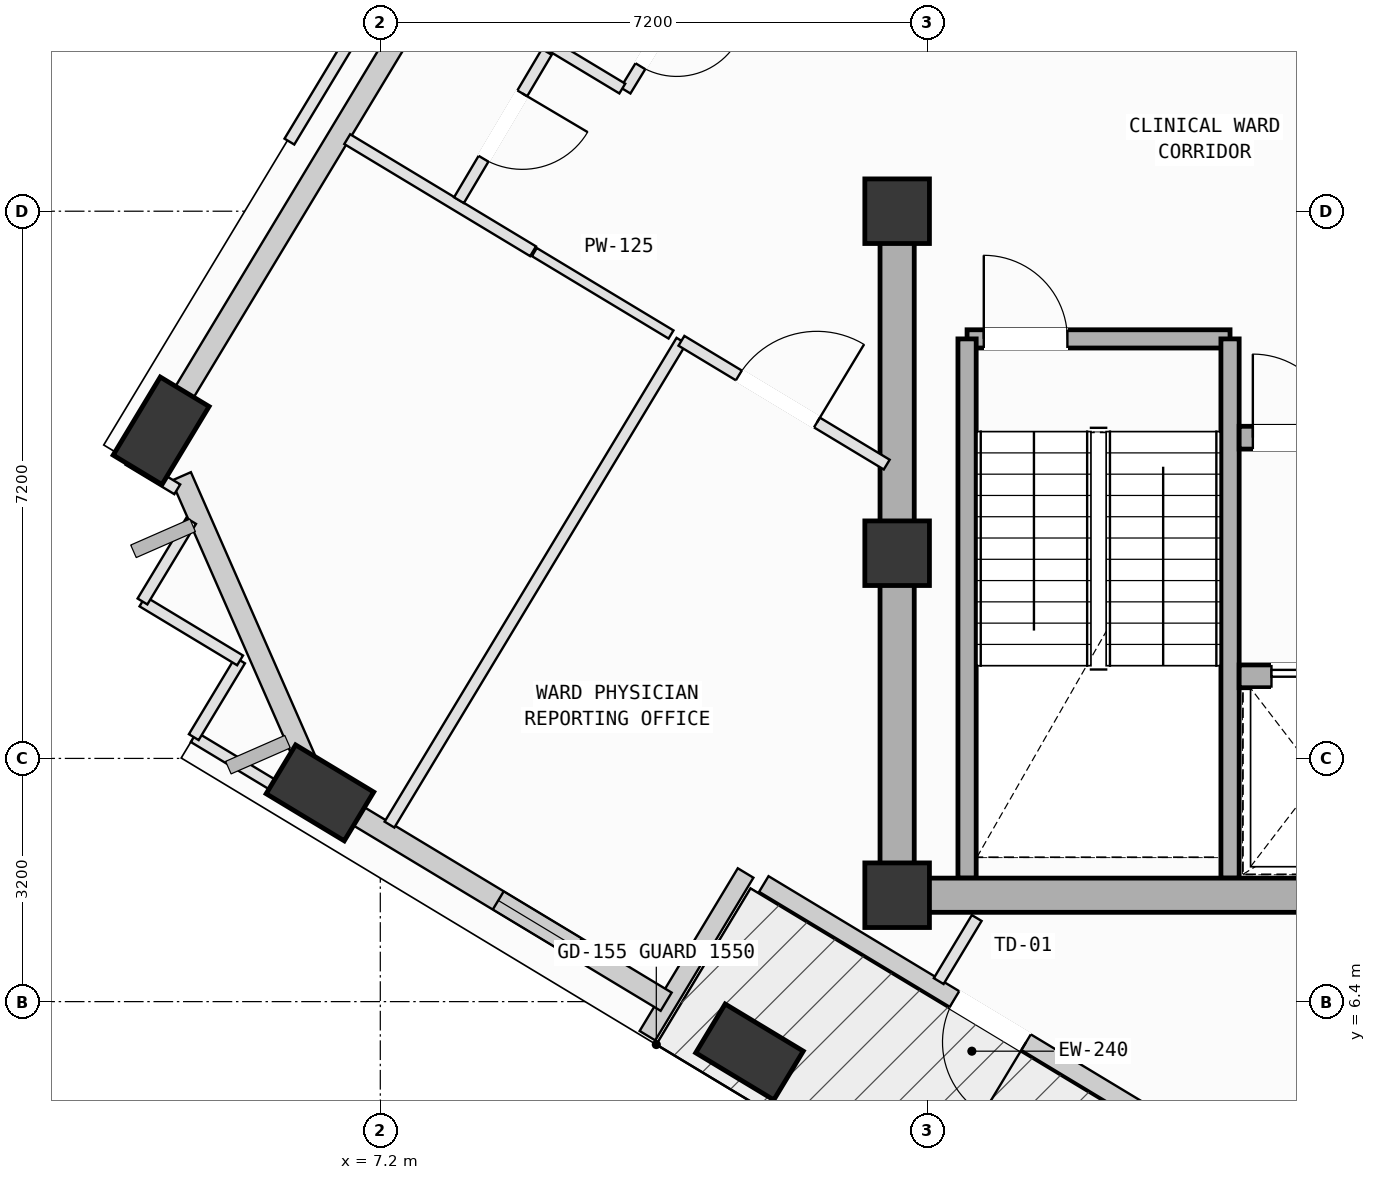
"""IFC4 building model, lengths in metres.
Left out: names, types, materials, properties, quantities, classifications, styles, units other than length and angle.
Written with IfcOpenShell. Run it as: python <this file> out.ifc"""

import sys

from ifc_helpers import new_model, si_unit, direction, frame, frame_2d, origin, origin_2d, place, context, subcontext, project, spatial, rectangle, extrude, element, fill, save


model = new_model("IFC4")
c1 = context("Model", 3, precision=1e-05, world=origin(), true_north=direction((0.0, 1.0)))
c2 = subcontext(c1, "Body", "Model", "MODEL_VIEW")
j1 = project(units=[si_unit("LENGTHUNIT", "METRE"), si_unit("PLANEANGLEUNIT", "RADIAN")], contexts=[c1])
p1 = place(None, origin())
s1 = spatial("IfcSite", under=j1, at=p1, CompositionType="ELEMENT")
p2 = place(p1, origin())
s2 = spatial("IfcBuilding", under=s1, at=p2, CompositionType="ELEMENT")
p3 = place(p2, frame((0.0, 0.0, 276.6)))
s3 = spatial("IfcBuildingStorey", under=s2, at=p3, CompositionType="ELEMENT", Elevation=276.6)
for number, where, z_axis, x_axis in (
    (1, (14.0, 7.8, 0.0), (0.0, 0.0, 1.0), (1.0, 0.0, 0.0)),
    (2, (14.0, 12.3, 0.0), (0.0, 0.0, 1.0), (1.0, 0.0, 0.0)),
    (3, (14.0, 16.8, 0.0), (0.0, 0.0, 1.0), (1.0, 0.0, 0.0)),
):
    element("IfcColumn", number, at=place(p3, frame(where, z_axis=z_axis, x_axis=x_axis)), inside=s3, PredefinedType="COLUMN", context=c2, shape_type="SweptSolid", body=[
        extrude(rectangle(XDim=0.85, YDim=0.85, at=origin_2d()), origin(), (0.0, 0.0, 1.0), 4.0),
    ])
p4 = place(p3, frame((4.316, 13.911, 0.002), z_axis=(0.045741739256, -0.120019053598, 0.991717258125), x_axis=(0.180248165753, 0.977453424246, 0.109979098802)))
e4 = element("IfcColumn", 4, at=p4, inside=s3, PredefinedType="COLUMN", context=c2, shape_type="SweptSolid", body=[
    extrude(rectangle(XDim=1.2, YDim=0.75, at=origin_2d()), origin(), (0.0, 0.0, 1.0), 4.03),
])
p5 = place(p3, frame((6.406, 9.146, 0.002), z_axis=(0.065245773454, -0.111226778145, 0.991650943059), x_axis=(-0.997742461186, 0.008568024773, 0.066607582881)))
e5 = element("IfcColumn", 5, at=p5, inside=s3, PredefinedType="COLUMN", context=c2, shape_type="SweptSolid", body=[
    extrude(rectangle(XDim=1.2, YDim=0.75, at=origin_2d()), origin(), (0.0, 0.0, 1.0), 4.03),
])
p6 = place(p3, frame((12.057, 5.738, 0.002), z_axis=(0.079223540484, -0.088019415959, 0.992963349297), x_axis=(-0.979562133865, -0.191615202588, 0.06116894666)))
e6 = element("IfcColumn", 6, at=p6, inside=s3, PredefinedType="COLUMN", context=c2, shape_type="SweptSolid", body=[
    extrude(rectangle(XDim=1.2, YDim=0.75, at=origin_2d()), origin(), (0.0, 0.0, 1.0), 4.025),
])
p7 = place(p3, frame((18.206, 4.353, 0.0), z_axis=(0.0, 0.0, 1.0), x_axis=(-0.856267913318, 0.516531955084, 0.0)))
e7 = element("IfcWall", 7, at=p7, inside=s3, PredefinedType="SOLIDWALL", context=c2, shape_type="SweptSolid", body=[
    extrude(rectangle(XDim=6.96, YDim=0.24, at=frame_2d((3.48, 0.0))), origin(), (0.0, 0.0, 1.0), 3.265),
])
p8 = place(p7, frame((2.93, 0.0, 0.0)))
e8 = element("IfcOpeningElement", 8, at=p8, cuts=e7, PredefinedType="OPENING", context=c2, shape_type="SweptSolid", body=[
    extrude(rectangle(XDim=1.1, YDim=2.15, at=frame_2d((0.55, 1.075))), frame((0.0, 0.13, 0.0), z_axis=(0.0, -1.0, 0.0), x_axis=(1.0, 0.0, 0.0)), (0.0, 0.0, 1.0), 0.26),
])
p9 = place(p3, frame((12.006, 8.093, 0.0), z_axis=(0.0, 0.0, 1.0), x_axis=(-0.516590911312, -0.856232346008, 0.0)))
e9 = element("IfcWall", 9, at=p9, inside=s3, PredefinedType="SOLIDWALL", context=c2, shape_type="SweptSolid", body=[
    extrude(rectangle(XDim=2.5, YDim=0.24, at=frame_2d((1.25, 0.0))), origin(), (0.0, 0.0, 1.0), 3.265),
])
p10 = place(p3, frame((4.41, 14.066, 0.0), z_axis=(0.0, 0.0, 1.0), x_axis=(0.516542521572, 0.856261539138, 0.0)))
e10 = element("IfcWall", 10, at=p10, inside=s3, PredefinedType="SOLIDWALL", context=c2, shape_type="SweptSolid", body=[
    extrude(rectangle(XDim=7.485, YDim=0.28, at=frame_2d((3.742, 0.0))), origin(), (0.0, 0.0, 1.0), 3.265),
])
p11 = place(p3, frame((6.351, 9.273, 0.0), z_axis=(0.0, 0.0, 1.0), x_axis=(-0.401698979628, 0.91577176729, 0.0)))
e11 = element("IfcWall", 11, at=p11, inside=s3, PredefinedType="SOLIDWALL", context=c2, shape_type="SweptSolid", body=[
    extrude(rectangle(XDim=4.408, YDim=0.28, at=frame_2d((2.204, 0.0))), origin(), (0.0, 0.0, 1.0), 3.265),
])
p12 = place(p3, frame((10.961, 6.399, 0.0), z_axis=(0.0, 0.0, 1.0), x_axis=(-0.856261128113, 0.51654320292, 0.0)))
e12 = element("IfcWall", 12, at=p12, inside=s3, PredefinedType="SOLIDWALL", context=c2, shape_type="SweptSolid", body=[
    extrude(rectangle(XDim=4.714, YDim=0.28, at=frame_2d((2.357, 0.0))), origin(), (0.0, 0.0, 1.0), 3.245),
])
p13 = place(p12, frame((1.38, 0.0, 0.75)))
e13 = element("IfcOpeningElement", 13, at=p13, cuts=e12, PredefinedType="OPENING", context=c2, shape_type="SweptSolid", body=[
    extrude(rectangle(XDim=1.2, YDim=1.75, at=frame_2d((0.6, 0.875))), frame((0.0, 0.15, 0.0), z_axis=(0.0, -1.0, 0.0), x_axis=(1.0, 0.0, 0.0)), (0.0, 0.0, 1.0), 0.3),
])
p14 = place(p3, frame((14.92, 15.12, 0.0), z_axis=(0.0, 0.0, 1.0), x_axis=(1.0, 0.0, 0.0)))
e14 = element("IfcWall", 14, at=p14, inside=s3, PredefinedType="SOLIDWALL", context=c2, shape_type="SweptSolid", body=[
    extrude(rectangle(XDim=3.46, YDim=0.24, at=frame_2d((1.73, 0.0))), origin(), (0.0, 0.0, 1.0), 3.78),
])
p15 = place(p14, frame((0.22, 0.0, 0.0)))
e15 = element("IfcOpeningElement", 15, at=p15, cuts=e14, PredefinedType="OPENING", context=c2, shape_type="SweptSolid", body=[
    extrude(rectangle(XDim=1.1, YDim=2.15, at=frame_2d((0.55, 1.075))), frame((0.0, 0.13, 0.0), z_axis=(0.0, -1.0, 0.0), x_axis=(1.0, 0.0, 0.0)), (0.0, 0.0, 1.0), 0.26),
])
for number, where, z_axis, x_axis in (
    (16, (18.38, 15.12, 0.0), (0.0, 0.0, 1.0), (0.0, -1.0, 0.0)),
    (17, (14.92, 8.025, 0.0), (0.0, 0.0, 1.0), (0.0, 1.0, 0.0)),
):
    element("IfcWall", number, at=place(p3, frame(where, z_axis=z_axis, x_axis=x_axis)), inside=s3, PredefinedType="SOLIDWALL", context=c2, shape_type="SweptSolid", body=[
        extrude(rectangle(XDim=7.095, YDim=0.24, at=frame_2d((3.548, 0.0))), origin(), (0.0, 0.0, 1.0), 3.78),
    ])
p16 = place(p3, frame((14.0, 7.8, 0.0), z_axis=(0.0, 0.0, 1.0), x_axis=(1.0, 0.0, 0.0)))
e18 = element("IfcWall", 18, at=p16, inside=s3, PredefinedType="SHEAR", context=c2, shape_type="SweptSolid", body=[
    extrude(rectangle(XDim=10.8, YDim=0.45, at=frame_2d((5.4, 0.0))), origin(), (0.0, 0.0, 1.0), 3.78),
])
p17 = place(p3, frame((14.0, 16.8, 0.0), z_axis=(0.0, 0.0, 1.0), x_axis=(0.0, -1.0, 0.0)))
e19 = element("IfcWall", 19, at=p17, inside=s3, PredefinedType="SHEAR", context=c2, shape_type="SweptSolid", body=[
    extrude(rectangle(XDim=9.0, YDim=0.45, at=frame_2d((4.5, 0.0))), origin(), (0.0, 0.0, 1.0), 3.78),
])
p18 = place(p3, frame((18.5, 10.68, 0.0), z_axis=(0.0, 0.0, 1.0), x_axis=(1.0, 0.0, 0.0)))
e20 = element("IfcWall", 20, at=p18, inside=s3, PredefinedType="SOLIDWALL", context=c2, shape_type="SweptSolid", body=[
    extrude(rectangle(XDim=5.3, YDim=0.3, at=frame_2d((2.65, 0.0))), origin(), (0.0, 0.0, 1.0), 3.78),
])
p19 = place(p18, frame((4.22, 0.0, 0.0)))
e21 = element("IfcOpeningElement", 21, at=p19, cuts=e20, PredefinedType="OPENING", context=c2, shape_type="SweptSolid", body=[
    extrude(rectangle(XDim=0.86, YDim=2.06, at=frame_2d((0.43, 1.03))), frame((0.0, 0.16, 0.0), z_axis=(0.0, -1.0, 0.0), x_axis=(1.0, 0.0, 0.0)), (0.0, 0.0, 1.0), 0.32),
])
p20 = place(p18, frame((0.425, 0.0, 0.0)))
e22 = element("IfcOpeningElement", 22, at=p20, cuts=e20, PredefinedType="OPENING", context=c2, shape_type="SweptSolid", body=[
    extrude(rectangle(XDim=1.25, YDim=2.18, at=frame_2d((0.625, 1.09))), frame((0.0, 0.16, 0.0), z_axis=(0.0, -1.0, 0.0), x_axis=(1.0, 0.0, 0.0)), (0.0, 0.0, 1.0), 0.32),
])
p21 = place(p18, frame((2.525, 0.0, 0.0)))
e23 = element("IfcOpeningElement", 23, at=p21, cuts=e20, PredefinedType="OPENING", context=c2, shape_type="SweptSolid", body=[
    extrude(rectangle(XDim=1.25, YDim=2.18, at=frame_2d((0.625, 1.09))), frame((0.0, 0.16, 0.0), z_axis=(0.0, -1.0, 0.0), x_axis=(1.0, 0.0, 0.0)), (0.0, 0.0, 1.0), 0.32),
])
p22 = place(p3, frame((18.5, 13.82, 0.0), z_axis=(0.0, 0.0, 1.0), x_axis=(1.0, 0.0, 0.0)))
e24 = element("IfcWall", 24, at=p22, inside=s3, PredefinedType="SOLIDWALL", context=c2, shape_type="SweptSolid", body=[
    extrude(rectangle(XDim=5.3, YDim=0.3, at=frame_2d((2.65, 0.0))), origin(), (0.0, 0.0, 1.0), 3.78),
])
p23 = place(p22, frame((0.18, 0.0, 0.0)))
e25 = element("IfcOpeningElement", 25, at=p23, cuts=e24, PredefinedType="OPENING", context=c2, shape_type="SweptSolid", body=[
    extrude(rectangle(XDim=1.1, YDim=2.15, at=frame_2d((0.55, 1.075))), frame((0.0, 0.16, 0.0), z_axis=(0.0, -1.0, 0.0), x_axis=(1.0, 0.0, 0.0)), (0.0, 0.0, 1.0), 0.32),
])
p24 = place(p3, frame((18.795, 1.807, 0.0), z_axis=(0.0, 0.0, 1.0), x_axis=(0.516562549991, 0.856249456611, 0.0)))
e26 = element("IfcWall", 26, at=p24, inside=s3, PredefinedType="PARTITIONING", context=c2, shape_type="SweptSolid", body=[
    extrude(rectangle(XDim=6.839, YDim=0.15, at=frame_2d((3.42, 0.0))), origin(), (0.0, 0.0, 1.0), 3.78),
])
p25 = place(p3, frame((7.321, 8.729, 0.0), z_axis=(0.0, 0.0, 1.0), x_axis=(0.516618899953, 0.856215458989, 0.0)))
e27 = element("IfcWall", 27, at=p25, inside=s3, PredefinedType="PARTITIONING", context=c2, shape_type="SweptSolid", body=[
    extrude(rectangle(XDim=7.435, YDim=0.15, at=frame_2d((3.718, 0.0))), origin(), (0.0, 0.0, 1.0), 3.78),
])
p26 = place(p3, frame((11.162, 15.095, 0.0), z_axis=(0.0, 0.0, 1.0), x_axis=(0.85632282347, -0.516440918213, 0.0)))
e28 = element("IfcWall", 28, at=p26, inside=s3, PredefinedType="PARTITIONING", context=c2, shape_type="SweptSolid", body=[
    extrude(rectangle(XDim=3.154, YDim=0.15, at=frame_2d((1.577, 0.0))), origin(), (0.0, 0.0, 1.0), 3.78),
])
p27 = place(p26, frame((0.882, 0.0, 0.0)))
e29 = element("IfcOpeningElement", 29, at=p27, cuts=e28, PredefinedType="OPENING", context=c2, shape_type="SweptSolid", body=[
    extrude(rectangle(XDim=1.2, YDim=2.15, at=frame_2d((0.6, 1.075))), frame((0.0, 0.085, 0.0), z_axis=(0.0, -1.0, 0.0), x_axis=(1.0, 0.0, 0.0)), (0.0, 0.0, 1.0), 0.17),
])
p28 = place(p3, frame((15.047, 7.5, 0.0), z_axis=(0.0, 0.0, 1.0), x_axis=(-0.515976998155, -0.856602438343, 0.0)))
e30 = element("IfcWall", 30, at=p28, inside=s3, PredefinedType="PARTITIONING", context=c2, shape_type="SweptSolid", body=[
    extrude(rectangle(XDim=0.969, YDim=0.15, at=frame_2d((0.484, 0.0))), origin(), (0.0, 0.0, 1.0), 3.78),
])
p29 = place(p3, frame((4.529, 13.141, 0.0), z_axis=(0.0, 0.0, 1.0), x_axis=(-0.856485572998, 0.516170963195, 0.0)))
e31 = element("IfcWall", 31, at=p29, inside=s3, PredefinedType="PARTITIONING", context=c2, shape_type="SweptSolid", body=[
    extrude(rectangle(XDim=0.75, YDim=0.15, at=frame_2d((0.375, 0.0))), origin(), (0.0, 0.0, 1.0), 3.78),
])
p30 = place(p3, frame((3.887, 13.528, 0.0), z_axis=(0.0, 0.0, 1.0), x_axis=(0.516850632135, 0.856075594829, 0.0)))
e32 = element("IfcWall", 32, at=p30, inside=s3, PredefinedType="PARTITIONING", context=c2, shape_type="SweptSolid", body=[
    extrude(rectangle(XDim=0.731, YDim=0.15, at=frame_2d((0.366, 0.0))), origin(), (0.0, 0.0, 1.0), 3.78),
])
p31 = place(p3, frame((6.765, 17.748, 0.0), z_axis=(0.0, 0.0, 1.0), x_axis=(0.856245690324, -0.516568792904, 0.0)))
e33 = element("IfcWall", 33, at=p31, inside=s3, PredefinedType="PARTITIONING", context=c2, shape_type="SweptSolid", body=[
    extrude(rectangle(XDim=2.855, YDim=0.15, at=frame_2d((1.428, 0.0))), origin(), (0.0, 0.0, 1.0), 3.78),
])
p32 = place(p3, frame((6.806, 8.637, 0.0), z_axis=(0.0, 0.0, 1.0), x_axis=(-0.856200818685, 0.516643163201, 0.0)))
e34 = element("IfcWall", 34, at=p32, inside=s3, PredefinedType="PARTITIONING", context=c2, shape_type="SweptSolid", body=[
    extrude(rectangle(XDim=2.406, YDim=0.15, at=frame_2d((1.203, 0.0))), origin(), (0.0, 0.0, 1.0), 3.245),
])
p33 = place(p3, frame((4.746, 9.88, 0.0), z_axis=(0.0, 0.0, 1.0), x_axis=(0.516290770158, 0.856413358519, 0.0)))
e35 = element("IfcWall", 35, at=p33, inside=s3, PredefinedType="PARTITIONING", context=c2, shape_type="SweptSolid", body=[
    extrude(rectangle(XDim=1.179, YDim=0.15, at=frame_2d((0.59, 0.0))), origin(), (0.0, 0.0, 1.0), 3.78),
])
p34 = place(p3, frame((5.355, 10.89, 0.0), z_axis=(0.0, 0.0, 1.0), x_axis=(-0.856082111936, 0.516839837497, 0.0)))
e36 = element("IfcWall", 36, at=p34, inside=s3, PredefinedType="PARTITIONING", context=c2, shape_type="SweptSolid", body=[
    extrude(rectangle(XDim=1.5, YDim=0.15, at=frame_2d((0.75, 0.0))), origin(), (0.0, 0.0, 1.0), 3.78),
])
p35 = place(p3, frame((4.071, 11.665, 0.0), z_axis=(0.0, 0.0, 1.0), x_axis=(0.51678458006, 0.856115469906, 0.0)))
e37 = element("IfcWall", 37, at=p35, inside=s3, PredefinedType="PARTITIONING", context=c2, shape_type="SweptSolid", body=[
    extrude(rectangle(XDim=1.238, YDim=0.15, at=frame_2d((0.619, 0.0))), origin(), (0.0, 0.0, 1.0), 3.78),
])
p36 = place(p3, frame((9.227, 16.262, 0.0), z_axis=(0.0, 0.0, 1.0), x_axis=(0.856382731236, -0.516341570707, 0.0)))
e38 = element("IfcWall", 38, at=p36, inside=s3, PredefinedType="PARTITIONING", context=c2, shape_type="SweptSolid", body=[
    extrude(rectangle(XDim=2.099, YDim=0.125, at=frame_2d((1.05, 0.0))), origin(), (0.0, 0.0, 1.0), 3.78),
])
p37 = place(p3, frame((11.295, 19.813, 0.0), z_axis=(0.0, 0.0, 1.0), x_axis=(-0.520165097053, -0.854065730379, 0.0)))
e39 = element("IfcWall", 39, at=p37, inside=s3, PredefinedType="PARTITIONING", context=c2, shape_type="SweptSolid", body=[
    extrude(rectangle(XDim=1.668, YDim=0.15, at=frame_2d((0.834, 0.0))), origin(), (0.0, 0.0, 1.0), 3.78),
])
p38 = place(p37, frame((0.374, 0.0, 0.0)))
e40 = element("IfcOpeningElement", 40, at=p38, cuts=e39, PredefinedType="OPENING", context=c2, shape_type="SweptSolid", body=[
    extrude(rectangle(XDim=0.92, YDim=2.1, at=frame_2d((0.46, 1.05))), frame((0.0, 0.085, 0.0), z_axis=(0.0, -1.0, 0.0), x_axis=(1.0, 0.0, 0.0)), (0.0, 0.0, 1.0), 0.17),
])
p39 = place(p3, frame((10.384, 18.414, 0.0), z_axis=(0.0, 0.0, 1.0), x_axis=(-0.856466725224, 0.516202236128, 0.0)))
e41 = element("IfcWall", 41, at=p39, inside=s3, PredefinedType="PARTITIONING", context=c2, shape_type="SweptSolid", body=[
    extrude(rectangle(XDim=2.754, YDim=0.15, at=frame_2d((1.377, 0.0))), origin(), (0.0, 0.0, 1.0), 3.78),
])
p40 = place(p3, frame((9.391, 18.896, 0.0), z_axis=(0.0, 0.0, 1.0), x_axis=(-0.509769928001, -0.860310769726, 0.0)))
e42 = element("IfcWall", 42, at=p40, inside=s3, PredefinedType="PARTITIONING", context=c2, shape_type="SweptSolid", body=[
    extrude(rectangle(XDim=2.268, YDim=0.15, at=frame_2d((1.134, 0.0))), origin(), (0.0, 0.0, 1.0), 3.78),
])
p41 = place(p40, frame((0.634, 0.0, 0.0)))
e43 = element("IfcOpeningElement", 43, at=p41, cuts=e42, PredefinedType="OPENING", context=c2, shape_type="SweptSolid", body=[
    extrude(rectangle(XDim=1.0, YDim=2.12, at=frame_2d((0.5, 1.06))), frame((0.0, 0.085, 0.0), z_axis=(0.0, -1.0, 0.0), x_axis=(1.0, 0.0, 0.0)), (0.0, 0.0, 1.0), 0.17),
])
p42 = place(p3, frame((6.004, 17.716, 0.0), z_axis=(0.0, 0.0, 1.0), x_axis=(0.51662857817, 0.856209619321, 0.0)))
e44 = element("IfcWall", 44, at=p42, inside=s3, PredefinedType="PARTITIONING", context=c2, shape_type="SweptSolid", body=[
    extrude(rectangle(XDim=6.19, YDim=0.15, at=frame_2d((3.095, 0.0))), origin(), (0.0, 0.0, 1.0), 3.78),
])
p43 = place(p8, origin())
e45 = element("IfcDoor", 45, at=p43, inside=s3, OperationType="SINGLE_SWING_LEFT", PredefinedType="DOOR", context=c2, shape_type="SweptSolid", body=[
    extrude(rectangle(XDim=1.1, YDim=2.15, at=frame_2d((0.55, 1.075))), frame((0.0, 0.025, 0.0), z_axis=(0.0, -1.0, 0.0), x_axis=(1.0, 0.0, 0.0)), (0.0, 0.0, 1.0), 0.05),
])
fill(e8, e45)
p44 = place(p13, origin())
e46 = element("IfcWindow", 46, at=p44, inside=s3, PartitioningType="SINGLE_PANEL", PredefinedType="WINDOW", context=c2, shape_type="SweptSolid", body=[
    extrude(rectangle(XDim=1.2, YDim=1.75, at=frame_2d((0.6, 0.875))), frame((0.0, 0.03, 0.0), z_axis=(0.0, -1.0, 0.0), x_axis=(1.0, 0.0, 0.0)), (0.0, 0.0, 1.0), 0.06),
])
fill(e13, e46)
p45 = place(p15, origin())
e47 = element("IfcDoor", 47, at=p45, inside=s3, OperationType="SINGLE_SWING_LEFT", PredefinedType="DOOR", context=c2, shape_type="SweptSolid", body=[
    extrude(rectangle(XDim=1.1, YDim=2.15, at=frame_2d((0.55, 1.075))), frame((0.0, 0.025, 0.0), z_axis=(0.0, -1.0, 0.0), x_axis=(1.0, 0.0, 0.0)), (0.0, 0.0, 1.0), 0.05),
])
fill(e15, e47)
p46 = place(p23, origin())
e48 = element("IfcDoor", 48, at=p46, inside=s3, OperationType="SINGLE_SWING_LEFT", PredefinedType="DOOR", context=c2, shape_type="SweptSolid", body=[
    extrude(rectangle(XDim=1.1, YDim=2.15, at=frame_2d((0.55, 1.075))), frame((0.0, 0.025, 0.0), z_axis=(0.0, -1.0, 0.0), x_axis=(1.0, 0.0, 0.0)), (0.0, 0.0, 1.0), 0.05),
])
fill(e25, e48)
p47 = place(p20, origin())
e49 = element("IfcDoor", 49, at=p47, inside=s3, OperationType="DOUBLE_DOOR_SLIDING", PredefinedType="DOOR", context=c2, shape_type="SweptSolid", body=[
    extrude(rectangle(XDim=1.25, YDim=2.18, at=frame_2d((0.625, 1.09))), frame((0.0, 0.025, 0.0), z_axis=(0.0, -1.0, 0.0), x_axis=(1.0, 0.0, 0.0)), (0.0, 0.0, 1.0), 0.05),
])
fill(e22, e49)
p48 = place(p27, origin())
e50 = element("IfcDoor", 50, at=p48, inside=s3, OperationType="SINGLE_SWING_RIGHT", PredefinedType="DOOR", context=c2, shape_type="SweptSolid", body=[
    extrude(rectangle(XDim=1.2, YDim=2.15, at=frame_2d((0.6, 1.075))), frame((0.0, 0.025, 0.0), z_axis=(0.0, -1.0, 0.0), x_axis=(1.0, 0.0, 0.0)), (0.0, 0.0, 1.0), 0.05),
])
fill(e29, e50)
p49 = place(p38, origin())
e51 = element("IfcDoor", 51, at=p49, inside=s3, OperationType="SINGLE_SWING_LEFT", PredefinedType="DOOR", context=c2, shape_type="SweptSolid", body=[
    extrude(rectangle(XDim=0.92, YDim=2.1, at=frame_2d((0.46, 1.05))), frame((0.0, 0.025, 0.0), z_axis=(0.0, -1.0, 0.0), x_axis=(1.0, 0.0, 0.0)), (0.0, 0.0, 1.0), 0.05),
])
fill(e40, e51)
p50 = place(p41, origin())
e52 = element("IfcDoor", 52, at=p50, inside=s3, OperationType="SINGLE_SWING_LEFT", PredefinedType="DOOR", context=c2, shape_type="SweptSolid", body=[
    extrude(rectangle(XDim=1.0, YDim=2.12, at=frame_2d((0.5, 1.06))), frame((0.0, 0.025, 0.0), z_axis=(0.0, -1.0, 0.0), x_axis=(1.0, 0.0, 0.0)), (0.0, 0.0, 1.0), 0.05),
])
fill(e43, e52)
save(model, sys.argv[1])
